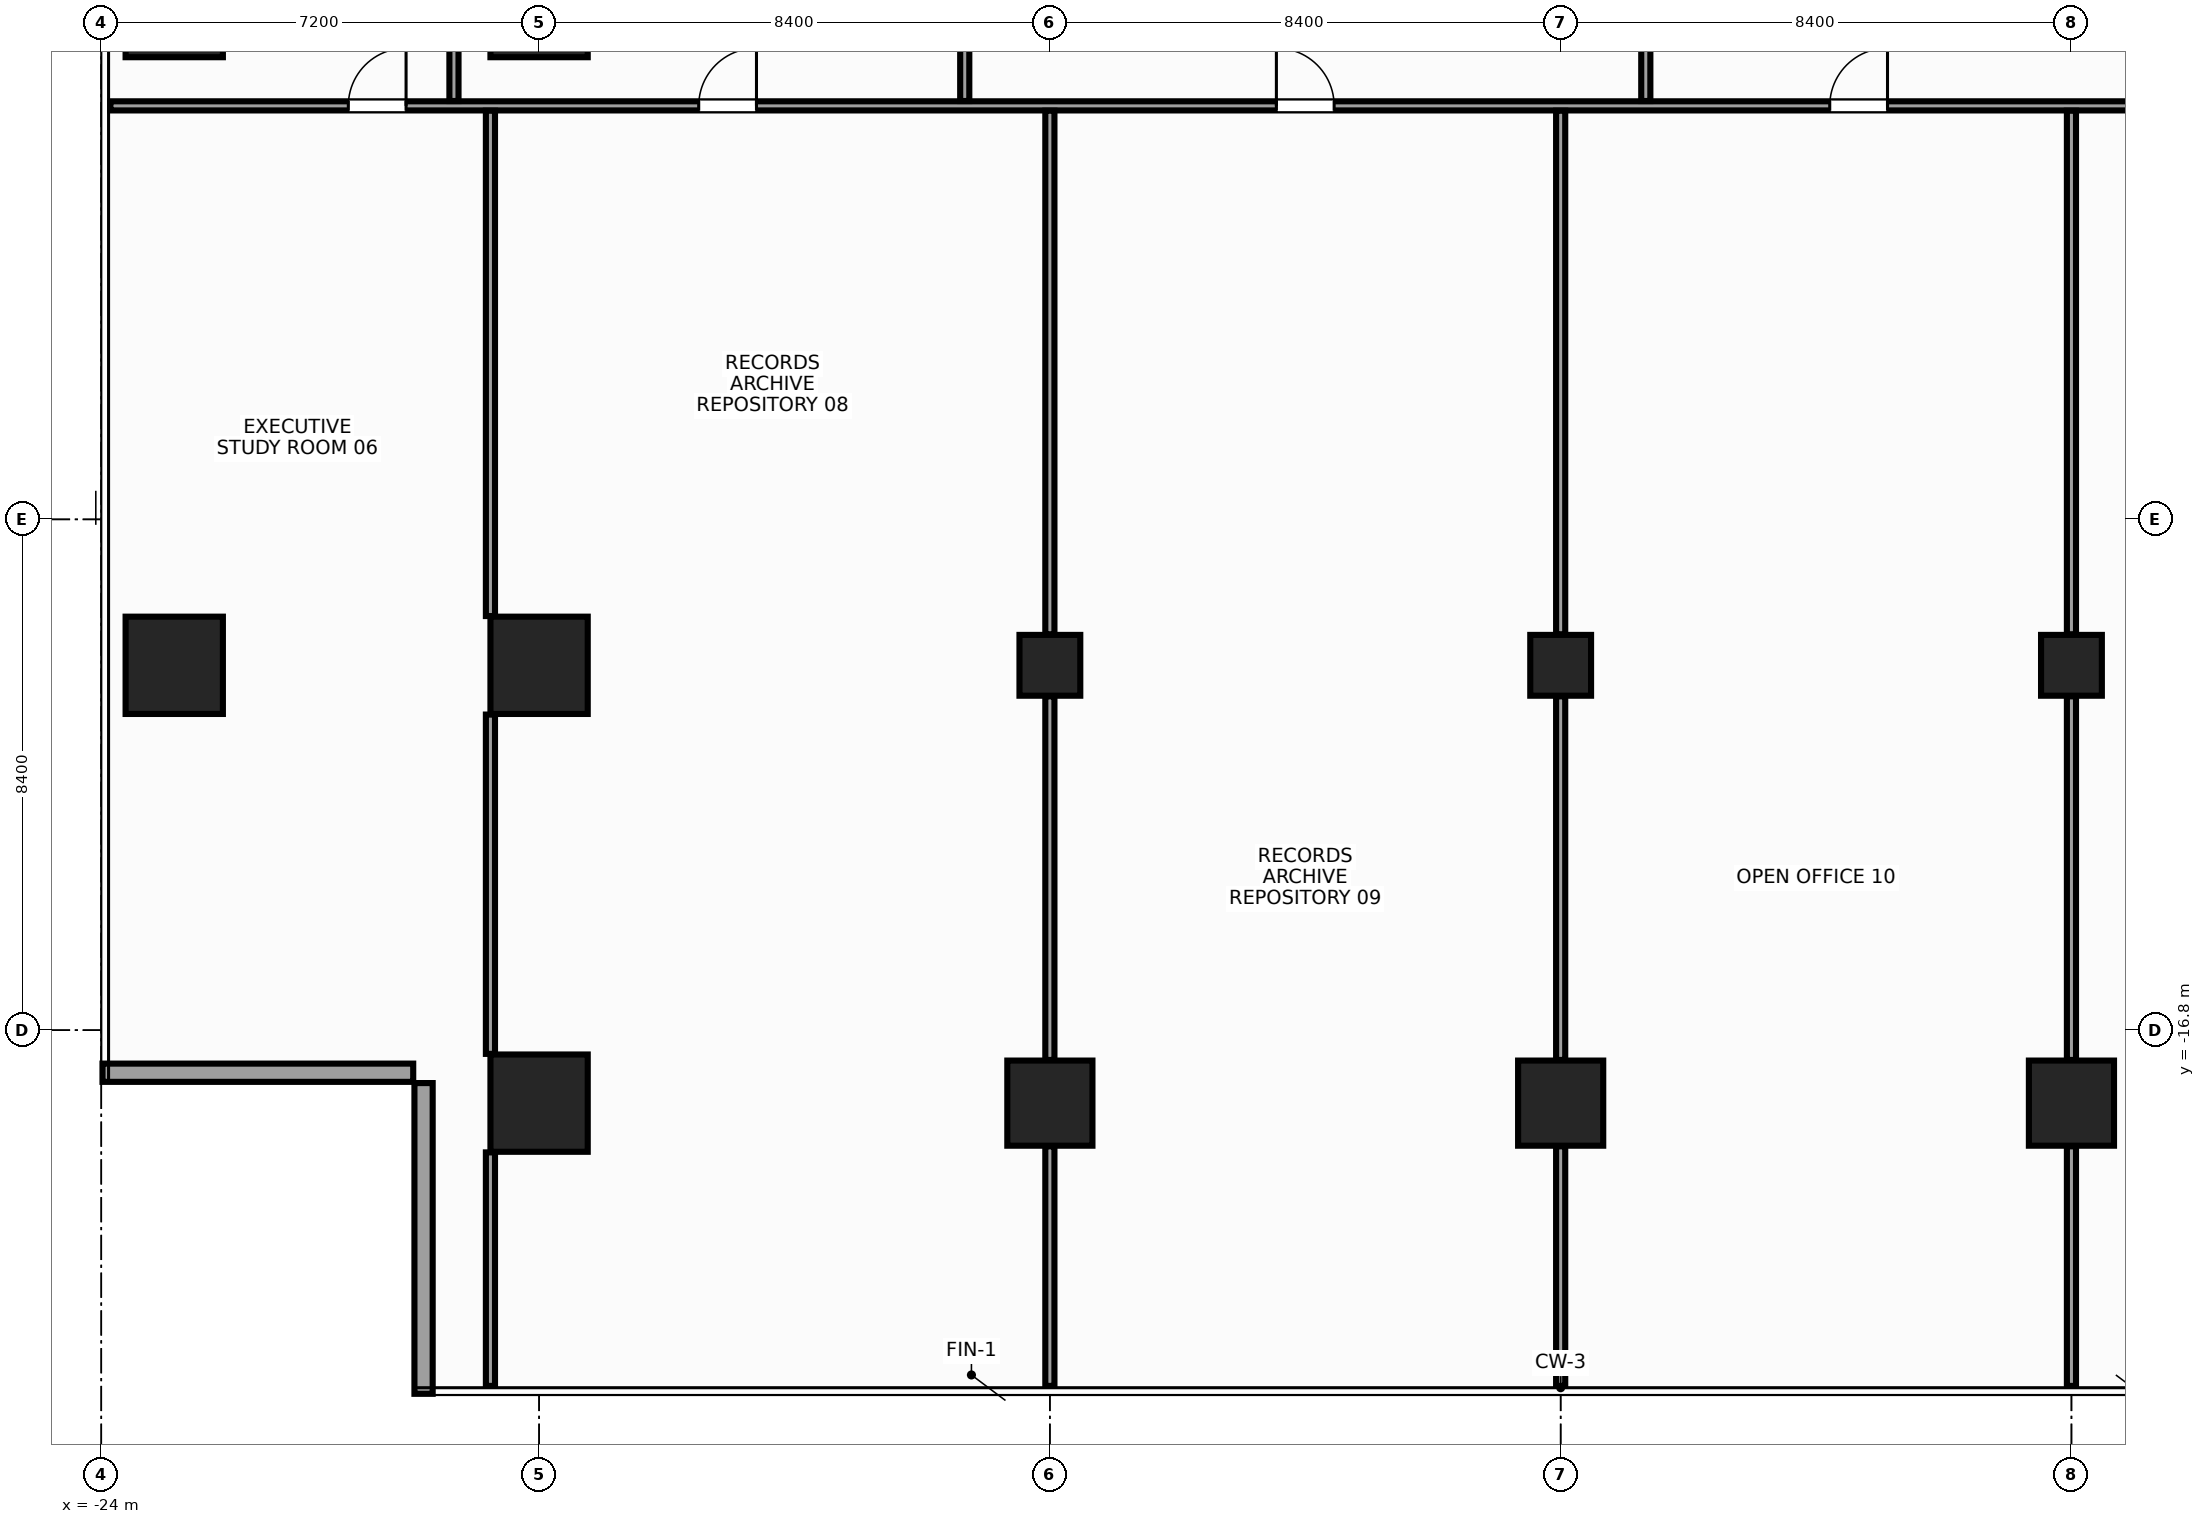
"""IFC4 building model, lengths in metres.
Left out: names, types, materials, properties, quantities, classifications, styles, units other than length and angle.
Written with IfcOpenShell. Run it as: python <this file> out.ifc"""

import sys

from ifc_helpers import new_model, si_unit, direction, frame, frame_2d, origin, origin_2d, place, context, subcontext, project, spatial, rectangle, hollow_rectangle, extrude, source, transform, mapped, element, fill, save


model = new_model("IFC4")
c1 = context("Model", 3, precision=1e-05, world=origin(), true_north=direction((0.0, 1.0)))
c2 = subcontext(c1, "Body", "Model", "MODEL_VIEW")
j1 = project(units=[si_unit("LENGTHUNIT", "METRE"), si_unit("PLANEANGLEUNIT", "RADIAN")], contexts=[c1])
p1 = place(None, origin())
s1 = spatial("IfcSite", under=j1, at=p1, CompositionType="ELEMENT")
p2 = place(p1, origin())
s2 = spatial("IfcBuilding", under=s1, at=p2, CompositionType="ELEMENT")
p3 = place(p2, frame((0.0, 0.0, 146.0)))
s3 = spatial("IfcBuildingStorey", under=s2, at=p3, CompositionType="ELEMENT", Elevation=146.0)
m1 = source(origin(), c2, "Body", "SweptSolid", [
    extrude(rectangle(XDim=1.6, YDim=1.6, at=origin_2d()), origin(), (0.0, 0.0, 1.0), 3.6),
])
for number, where, z_axis, x_axis in (
    (1, (-16.8, -18.0, 0.0), (0.0, 0.0, 1.0), (1.0, 0.0, 0.0)),
    (2, (-16.8, -10.8, 0.0), (0.0, 0.0, 1.0), (1.0, 0.0, 0.0)),
    (3, (-16.8, 0.0, 0.0), (0.0, 0.0, 1.0), (1.0, 0.0, 0.0)),
    (4, (-22.8, -10.8, 0.0), (0.0, 0.0, 1.0), (1.0, 0.0, 0.0)),
    (5, (-22.8, 0.0, 0.0), (0.0, 0.0, 1.0), (1.0, 0.0, 0.0)),
):
    element("IfcColumn", number, at=place(p3, frame(where, z_axis=z_axis, x_axis=x_axis)), inside=s3, PredefinedType="COLUMN", context=c2, shape_type="MappedRepresentation", body=[
        mapped(m1, transform((0.0, 0.0, 0.0), x_axis=(1.0, 0.0, 0.0), y_axis=(0.0, 1.0, 0.0), z_axis=(0.0, 0.0, 1.0), scale=1.0)),
    ])
m2 = source(origin(), c2, "Body", "SweptSolid", [
    extrude(rectangle(XDim=1.4, YDim=1.4, at=origin_2d()), origin(), (0.0, 0.0, 1.0), 3.6),
])
p4 = place(p3, frame((-8.4, -18.0, 0.0), z_axis=(0.0, 0.0, 1.0), x_axis=(1.0, 0.0, 0.0)))
e6 = element("IfcColumn", 6, at=p4, inside=s3, PredefinedType="COLUMN", context=c2, shape_type="MappedRepresentation", body=[
    mapped(m2, transform((0.0, 0.0, 0.0), x_axis=(1.0, 0.0, 0.0), y_axis=(0.0, 1.0, 0.0), z_axis=(0.0, 0.0, 1.0), scale=1.0)),
])
m3 = source(origin(), c2, "Body", "SweptSolid", [
    extrude(hollow_rectangle(XDim=1.0, YDim=1.0, WallThickness=0.045, at=origin_2d()), origin(), (0.0, 0.0, 1.0), 3.6),
])
p5 = place(p3, frame((-8.4, -10.8, 0.0), z_axis=(0.0, 0.0, 1.0), x_axis=(1.0, 0.0, 0.0)))
e7 = element("IfcColumn", 7, at=p5, inside=s3, PredefinedType="COLUMN", context=c2, shape_type="MappedRepresentation", body=[
    mapped(m3, transform((0.0, 0.0, 0.0), x_axis=(1.0, 0.0, 0.0), y_axis=(0.0, 1.0, 0.0), z_axis=(0.0, 0.0, 1.0), scale=1.0)),
])
p6 = place(p3, frame((8.4, -18.0, 0.0), z_axis=(0.0, 0.0, 1.0), x_axis=(1.0, 0.0, 0.0)))
e8 = element("IfcColumn", 8, at=p6, inside=s3, PredefinedType="COLUMN", context=c2, shape_type="MappedRepresentation", body=[
    mapped(m2, transform((0.0, 0.0, 0.0), x_axis=(1.0, 0.0, 0.0), y_axis=(0.0, 1.0, 0.0), z_axis=(0.0, 0.0, 1.0), scale=1.0)),
])
p7 = place(p3, frame((8.4, -10.8, 0.0), z_axis=(0.0, 0.0, 1.0), x_axis=(1.0, 0.0, 0.0)))
e9 = element("IfcColumn", 9, at=p7, inside=s3, PredefinedType="COLUMN", context=c2, shape_type="MappedRepresentation", body=[
    mapped(m3, transform((0.0, 0.0, 0.0), x_axis=(1.0, 0.0, 0.0), y_axis=(0.0, 1.0, 0.0), z_axis=(0.0, 0.0, 1.0), scale=1.0)),
])
p8 = place(p3, frame((0.0, -18.0, 0.0), z_axis=(0.0, 0.0, 1.0), x_axis=(1.0, 0.0, 0.0)))
e10 = element("IfcColumn", 10, at=p8, inside=s3, PredefinedType="COLUMN", context=c2, shape_type="MappedRepresentation", body=[
    mapped(m2, transform((0.0, 0.0, 0.0), x_axis=(1.0, 0.0, 0.0), y_axis=(0.0, 1.0, 0.0), z_axis=(0.0, 0.0, 1.0), scale=1.0)),
])
m4 = source(origin(), c2, "Body", "SweptSolid", [
    extrude(rectangle(XDim=1.0, YDim=1.0, at=origin_2d()), origin(), (0.0, 0.0, 1.0), 3.6),
])
p9 = place(p3, frame((0.0, -10.8, 0.0), z_axis=(0.0, 0.0, 1.0), x_axis=(1.0, 0.0, 0.0)))
e11 = element("IfcColumn", 11, at=p9, inside=s3, PredefinedType="COLUMN", context=c2, shape_type="MappedRepresentation", body=[
    mapped(m4, transform((0.0, 0.0, 0.0), x_axis=(1.0, 0.0, 0.0), y_axis=(0.0, 1.0, 0.0), z_axis=(0.0, 0.0, 1.0), scale=1.0)),
])
m5 = source(origin(), c2, "Body", "SweptSolid", [
    extrude(rectangle(XDim=5.11, YDim=0.3, at=frame_2d((2.555, 0.0))), origin(), (0.0, 0.0, 1.0), 2.76),
])
p10 = place(p3, frame((-23.98, -17.5, 0.0), z_axis=(0.0, 0.0, 1.0), x_axis=(1.0, 0.0, 0.0)))
e12 = element("IfcWall", 12, at=p10, inside=s3, PredefinedType="STANDARD", context=c2, shape_type="MappedRepresentation", body=[
    mapped(m5, transform((0.0, 0.0, 0.0), x_axis=(1.0, 0.0, 0.0), y_axis=(0.0, 1.0, 0.0), z_axis=(0.0, 0.0, 1.0), scale=1.0)),
])
m6 = source(origin(), c2, "Body", "SweptSolid", [
    extrude(rectangle(XDim=5.11, YDim=0.3, at=frame_2d((2.555, 0.0))), origin(), (0.0, 0.0, 1.0), 2.76),
])
p11 = place(p3, frame((-18.7, -17.67, 0.0), z_axis=(0.0, 0.0, 1.0), x_axis=(0.0, -1.0, 0.0)))
e13 = element("IfcWall", 13, at=p11, inside=s3, PredefinedType="STANDARD", context=c2, shape_type="MappedRepresentation", body=[
    mapped(m6, transform((0.0, 0.0, 0.0), x_axis=(1.0, 0.0, 0.0), y_axis=(0.0, 1.0, 0.0), z_axis=(0.0, 0.0, 1.0), scale=1.0)),
])
m7 = source(origin(), c2, "Body", "SweptSolid", [
    extrude(rectangle(XDim=34.895, YDim=0.15, at=frame_2d((17.448, 0.0))), origin(), (0.0, 0.0, 1.0), 2.765),
])
p12 = place(p3, frame((-23.85, -1.6, 0.0), z_axis=(0.0, 0.0, 1.0), x_axis=(1.0, 0.0, 0.0)))
e14 = element("IfcWall", 14, at=p12, inside=s3, PredefinedType="PARTITIONING", context=c2, shape_type="MappedRepresentation", body=[
    mapped(m7, transform((0.0, 0.0, 0.0), x_axis=(1.0, 0.0, 0.0), y_axis=(0.0, 1.0, 0.0), z_axis=(0.0, 0.0, 1.0), scale=1.0)),
])
p13 = place(p12, frame((3.913, 0.0, 0.0)))
e15 = element("IfcOpeningElement", 15, at=p13, cuts=e14, PredefinedType="OPENING", context=c2, shape_type="SweptSolid", body=[
    extrude(rectangle(XDim=0.95, YDim=2.15, at=frame_2d((0.475, 1.075))), frame((0.0, 0.087, 0.0), z_axis=(0.0, -1.0, 0.0), x_axis=(1.0, 0.0, 0.0)), (0.0, 0.0, 1.0), 0.174),
])
p14 = place(p12, frame((9.675, 0.0, 0.0)))
e16 = element("IfcOpeningElement", 16, at=p14, cuts=e14, PredefinedType="OPENING", context=c2, shape_type="SweptSolid", body=[
    extrude(rectangle(XDim=0.95, YDim=2.15, at=frame_2d((0.475, 1.075))), frame((0.0, 0.087, 0.0), z_axis=(0.0, -1.0, 0.0), x_axis=(1.0, 0.0, 0.0)), (0.0, 0.0, 1.0), 0.174),
])
p15 = place(p12, frame((19.175, 0.0, 0.0)))
e17 = element("IfcOpeningElement", 17, at=p15, cuts=e14, PredefinedType="OPENING", context=c2, shape_type="SweptSolid", body=[
    extrude(rectangle(XDim=0.95, YDim=2.15, at=frame_2d((0.475, 1.075))), frame((0.0, 0.087, 0.0), z_axis=(0.0, -1.0, 0.0), x_axis=(1.0, 0.0, 0.0)), (0.0, 0.0, 1.0), 0.174),
])
p16 = place(p12, frame((28.275, 0.0, 0.0)))
e18 = element("IfcOpeningElement", 18, at=p16, cuts=e14, PredefinedType="OPENING", context=c2, shape_type="SweptSolid", body=[
    extrude(rectangle(XDim=0.95, YDim=2.15, at=frame_2d((0.475, 1.075))), frame((0.0, 0.087, 0.0), z_axis=(0.0, -1.0, 0.0), x_axis=(1.0, 0.0, 0.0)), (0.0, 0.0, 1.0), 0.174),
])
m8 = source(origin(), c2, "Body", "SweptSolid", [
    extrude(rectangle(XDim=9.165, YDim=0.15, at=frame_2d((4.583, 0.0))), origin(), (0.0, 0.0, 1.0), 2.915),
])
p17 = place(p3, frame((-18.2, -1.52, 0.0), z_axis=(0.0, 0.0, 1.0), x_axis=(0.0, 1.0, 0.0)))
e19 = element("IfcWall", 19, at=p17, inside=s3, PredefinedType="PARTITIONING", context=c2, shape_type="MappedRepresentation", body=[
    mapped(m8, transform((0.0, 0.0, 0.0), x_axis=(1.0, 0.0, 0.0), y_axis=(0.0, 1.0, 0.0), z_axis=(0.0, 0.0, 1.0), scale=1.0)),
])
m9 = source(origin(), c2, "Body", "SweptSolid", [
    extrude(rectangle(XDim=9.165, YDim=0.15, at=frame_2d((4.583, 0.0))), origin(), (0.0, 0.0, 1.0), 2.665),
])
for number, where, z_axis, x_axis in (
    (20, (-9.8, -1.52, 0.0), (0.0, 0.0, 1.0), (0.0, 1.0, 0.0)),
    (21, (1.4, -1.52, 0.0), (0.0, 0.0, 1.0), (0.0, 1.0, 0.0)),
):
    element("IfcWall", number, at=place(p3, frame(where, z_axis=z_axis, x_axis=x_axis)), inside=s3, PredefinedType="PARTITIONING", context=c2, shape_type="MappedRepresentation", body=[
        mapped(m9, transform((0.0, 0.0, 0.0), x_axis=(1.0, 0.0, 0.0), y_axis=(0.0, 1.0, 0.0), z_axis=(0.0, 0.0, 1.0), scale=1.0)),
    ])
m10 = source(origin(), c2, "Body", "SweptSolid", [
    extrude(rectangle(XDim=3.84, YDim=0.15, at=frame_2d((1.92, 0.0))), origin(), (0.0, 0.0, 1.0), 3.38),
])
p18 = place(p3, frame((-17.6, -22.65, 0.0), z_axis=(0.0, 0.0, 1.0), x_axis=(0.0, 1.0, 0.0)))
e22 = element("IfcWall", 22, at=p18, inside=s3, PredefinedType="PARTITIONING", context=c2, shape_type="MappedRepresentation", body=[
    mapped(m10, transform((0.0, 0.0, 0.0), x_axis=(1.0, 0.0, 0.0), y_axis=(0.0, 1.0, 0.0), z_axis=(0.0, 0.0, 1.0), scale=1.0)),
])
m11 = source(origin(), c2, "Body", "SweptSolid", [
    extrude(rectangle(XDim=5.58, YDim=0.15, at=frame_2d((2.79, 0.0))), origin(), (0.0, 0.0, 1.0), 3.38),
])
p19 = place(p3, frame((-17.6, -17.19, 0.0), z_axis=(0.0, 0.0, 1.0), x_axis=(0.0, 1.0, 0.0)))
e23 = element("IfcWall", 23, at=p19, inside=s3, PredefinedType="PARTITIONING", context=c2, shape_type="MappedRepresentation", body=[
    mapped(m11, transform((0.0, 0.0, 0.0), x_axis=(1.0, 0.0, 0.0), y_axis=(0.0, 1.0, 0.0), z_axis=(0.0, 0.0, 1.0), scale=1.0)),
])
m12 = source(origin(), c2, "Body", "SweptSolid", [
    extrude(rectangle(XDim=8.31, YDim=0.15, at=frame_2d((4.155, 0.0))), origin(), (0.0, 0.0, 1.0), 3.38),
])
p20 = place(p3, frame((-17.6, -9.99, 0.0), z_axis=(0.0, 0.0, 1.0), x_axis=(0.0, 1.0, 0.0)))
e24 = element("IfcWall", 24, at=p20, inside=s3, PredefinedType="PARTITIONING", context=c2, shape_type="MappedRepresentation", body=[
    mapped(m12, transform((0.0, 0.0, 0.0), x_axis=(1.0, 0.0, 0.0), y_axis=(0.0, 1.0, 0.0), z_axis=(0.0, 0.0, 1.0), scale=1.0)),
])
m13 = source(origin(), c2, "Body", "SweptSolid", [
    extrude(rectangle(XDim=3.94, YDim=0.15, at=frame_2d((1.97, 0.0))), origin(), (0.0, 0.0, 1.0), 3.38),
])
p21 = place(p3, frame((-8.4, -22.65, 0.0), z_axis=(0.0, 0.0, 1.0), x_axis=(0.0, 1.0, 0.0)))
e25 = element("IfcWall", 25, at=p21, inside=s3, PredefinedType="PARTITIONING", context=c2, shape_type="MappedRepresentation", body=[
    mapped(m13, transform((0.0, 0.0, 0.0), x_axis=(1.0, 0.0, 0.0), y_axis=(0.0, 1.0, 0.0), z_axis=(0.0, 0.0, 1.0), scale=1.0)),
])
m14 = source(origin(), c2, "Body", "SweptSolid", [
    extrude(rectangle(XDim=5.98, YDim=0.15, at=frame_2d((2.99, 0.0))), origin(), (0.0, 0.0, 1.0), 2.965),
])
p22 = place(p3, frame((-8.4, -17.29, 0.0), z_axis=(0.0, 0.0, 1.0), x_axis=(0.0, 1.0, 0.0)))
e26 = element("IfcWall", 26, at=p22, inside=s3, PredefinedType="PARTITIONING", context=c2, shape_type="MappedRepresentation", body=[
    mapped(m14, transform((0.0, 0.0, 0.0), x_axis=(1.0, 0.0, 0.0), y_axis=(0.0, 1.0, 0.0), z_axis=(0.0, 0.0, 1.0), scale=1.0)),
])
m15 = source(origin(), c2, "Body", "SweptSolid", [
    extrude(rectangle(XDim=8.61, YDim=0.15, at=frame_2d((4.305, 0.0))), origin(), (0.0, 0.0, 1.0), 2.765),
])
p23 = place(p3, frame((-8.4, -10.29, 0.0), z_axis=(0.0, 0.0, 1.0), x_axis=(0.0, 1.0, 0.0)))
e27 = element("IfcWall", 27, at=p23, inside=s3, PredefinedType="PARTITIONING", context=c2, shape_type="MappedRepresentation", body=[
    mapped(m15, transform((0.0, 0.0, 0.0), x_axis=(1.0, 0.0, 0.0), y_axis=(0.0, 1.0, 0.0), z_axis=(0.0, 0.0, 1.0), scale=1.0)),
])
p24 = place(p3, frame((0.0, -22.65, 0.0), z_axis=(0.0, 0.0, 1.0), x_axis=(0.0, 1.0, 0.0)))
e28 = element("IfcWall", 28, at=p24, inside=s3, PredefinedType="PARTITIONING", context=c2, shape_type="MappedRepresentation", body=[
    mapped(m13, transform((0.0, 0.0, 0.0), x_axis=(1.0, 0.0, 0.0), y_axis=(0.0, 1.0, 0.0), z_axis=(0.0, 0.0, 1.0), scale=1.0)),
])
p25 = place(p3, frame((0.0, -17.29, 0.0), z_axis=(0.0, 0.0, 1.0), x_axis=(0.0, 1.0, 0.0)))
e29 = element("IfcWall", 29, at=p25, inside=s3, PredefinedType="PARTITIONING", context=c2, shape_type="MappedRepresentation", body=[
    mapped(m14, transform((0.0, 0.0, 0.0), x_axis=(1.0, 0.0, 0.0), y_axis=(0.0, 1.0, 0.0), z_axis=(0.0, 0.0, 1.0), scale=1.0)),
])
p26 = place(p3, frame((0.0, -10.29, 0.0), z_axis=(0.0, 0.0, 1.0), x_axis=(0.0, 1.0, 0.0)))
e30 = element("IfcWall", 30, at=p26, inside=s3, PredefinedType="PARTITIONING", context=c2, shape_type="MappedRepresentation", body=[
    mapped(m15, transform((0.0, 0.0, 0.0), x_axis=(1.0, 0.0, 0.0), y_axis=(0.0, 1.0, 0.0), z_axis=(0.0, 0.0, 1.0), scale=1.0)),
])
p27 = place(p3, frame((8.4, -22.65, 0.0), z_axis=(0.0, 0.0, 1.0), x_axis=(0.0, 1.0, 0.0)))
e31 = element("IfcWall", 31, at=p27, inside=s3, PredefinedType="PARTITIONING", context=c2, shape_type="MappedRepresentation", body=[
    mapped(m13, transform((0.0, 0.0, 0.0), x_axis=(1.0, 0.0, 0.0), y_axis=(0.0, 1.0, 0.0), z_axis=(0.0, 0.0, 1.0), scale=1.0)),
])
p28 = place(p3, frame((8.4, -17.29, 0.0), z_axis=(0.0, 0.0, 1.0), x_axis=(0.0, 1.0, 0.0)))
e32 = element("IfcWall", 32, at=p28, inside=s3, PredefinedType="PARTITIONING", context=c2, shape_type="MappedRepresentation", body=[
    mapped(m14, transform((0.0, 0.0, 0.0), x_axis=(1.0, 0.0, 0.0), y_axis=(0.0, 1.0, 0.0), z_axis=(0.0, 0.0, 1.0), scale=1.0)),
])
p29 = place(p3, frame((8.4, -10.29, 0.0), z_axis=(0.0, 0.0, 1.0), x_axis=(0.0, 1.0, 0.0)))
e33 = element("IfcWall", 33, at=p29, inside=s3, PredefinedType="PARTITIONING", context=c2, shape_type="MappedRepresentation", body=[
    mapped(m15, transform((0.0, 0.0, 0.0), x_axis=(1.0, 0.0, 0.0), y_axis=(0.0, 1.0, 0.0), z_axis=(0.0, 0.0, 1.0), scale=1.0)),
])
m16 = source(origin(), c2, "Body", "SweptSolid", [
    extrude(rectangle(XDim=0.95, YDim=2.15, at=frame_2d((0.475, 1.075))), frame((0.0, 0.025, 0.0), z_axis=(0.0, -1.0, 0.0), x_axis=(1.0, 0.0, 0.0)), (0.0, 0.0, 1.0), 0.05),
])
p30 = place(p13, origin())
e34 = element("IfcDoor", 34, at=p30, inside=s3, OperationType="SINGLE_SWING_RIGHT", PredefinedType="DOOR", context=c2, shape_type="MappedRepresentation", body=[
    mapped(m16, transform((0.0, 0.0, 0.0), x_axis=(1.0, 0.0, 0.0), y_axis=(0.0, 1.0, 0.0), z_axis=(0.0, 0.0, 1.0), scale=1.0)),
])
fill(e15, e34)
p31 = place(p14, origin())
e35 = element("IfcDoor", 35, at=p31, inside=s3, OperationType="SINGLE_SWING_RIGHT", PredefinedType="DOOR", context=c2, shape_type="MappedRepresentation", body=[
    mapped(m16, transform((0.0, 0.0, 0.0), x_axis=(1.0, 0.0, 0.0), y_axis=(0.0, 1.0, 0.0), z_axis=(0.0, 0.0, 1.0), scale=1.0)),
])
fill(e16, e35)
p32 = place(p15, origin())
e36 = element("IfcDoor", 36, at=p32, inside=s3, OperationType="SINGLE_SWING_LEFT", PredefinedType="DOOR", context=c2, shape_type="MappedRepresentation", body=[
    mapped(m16, transform((0.0, 0.0, 0.0), x_axis=(1.0, 0.0, 0.0), y_axis=(0.0, 1.0, 0.0), z_axis=(0.0, 0.0, 1.0), scale=1.0)),
])
fill(e17, e36)
p33 = place(p16, origin())
e37 = element("IfcDoor", 37, at=p33, inside=s3, OperationType="SINGLE_SWING_RIGHT", PredefinedType="DOOR", context=c2, shape_type="MappedRepresentation", body=[
    mapped(m16, transform((0.0, 0.0, 0.0), x_axis=(1.0, 0.0, 0.0), y_axis=(0.0, 1.0, 0.0), z_axis=(0.0, 0.0, 1.0), scale=1.0)),
])
fill(e18, e37)
save(model, sys.argv[1])
